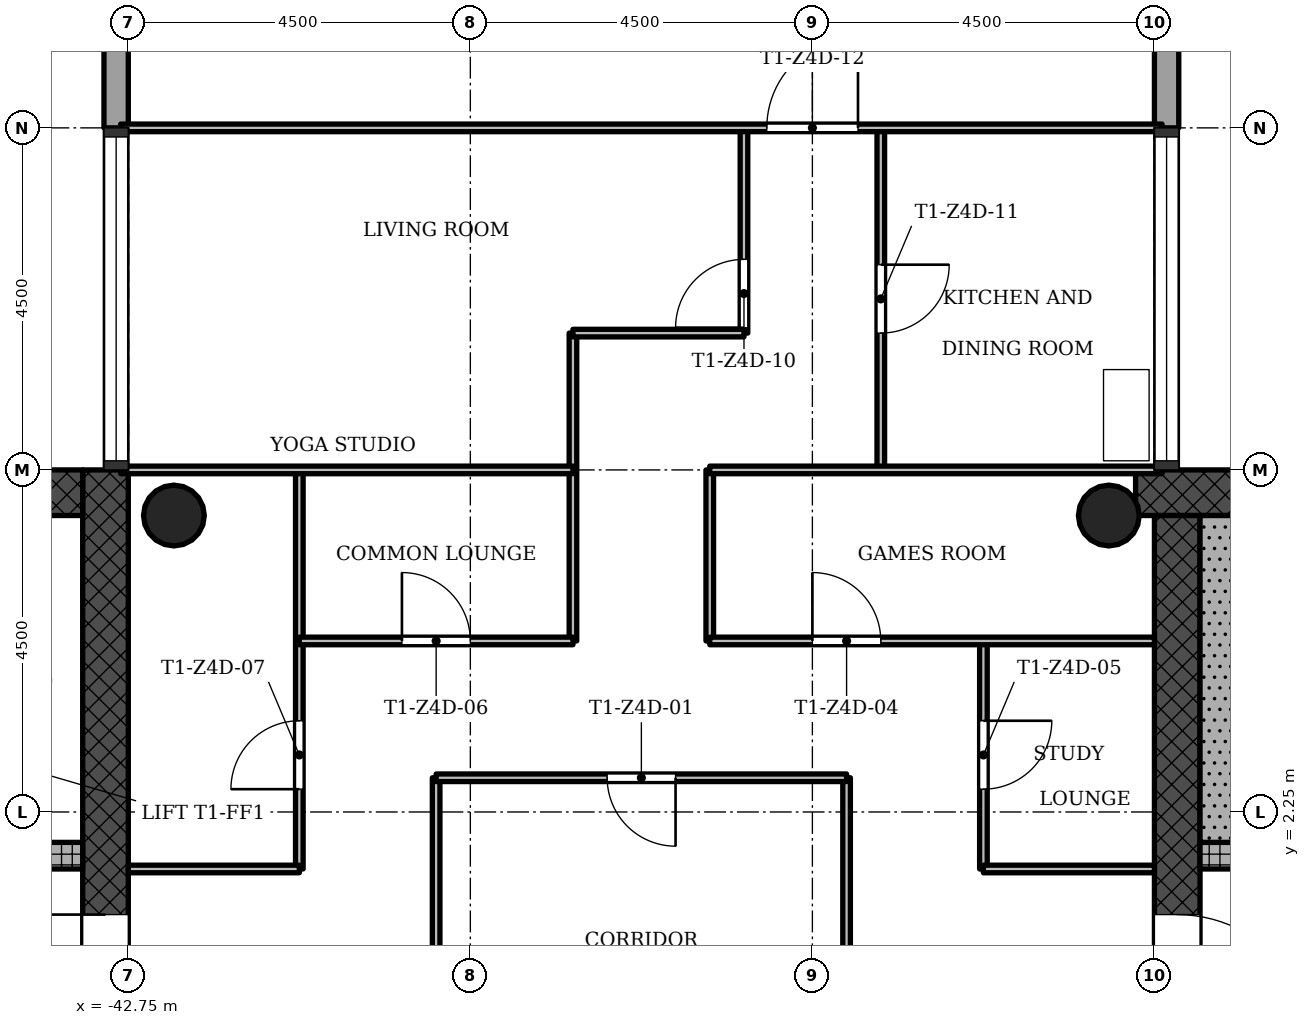
"""IFC4 building model, lengths in metres.
Left out: names, types, materials, properties, quantities, classifications, styles, units other than length and angle.
Written with IfcOpenShell. Run it as: python <this file> out.ifc"""

import sys

from ifc_helpers import new_model, si_unit, direction, frame, frame_2d, origin, origin_2d, place, context, subcontext, project, spatial, rectangle, hollow_circle, extrude, element, fill, save


model = new_model("IFC4")
c1 = context("Model", 3, precision=1e-05, world=origin(), true_north=direction((0.0, 1.0)))
c2 = subcontext(c1, "Body", "Model", "MODEL_VIEW")
j1 = project(units=[si_unit("LENGTHUNIT", "METRE"), si_unit("PLANEANGLEUNIT", "RADIAN")], contexts=[c1])
p1 = place(None, origin())
s1 = spatial("IfcSite", under=j1, at=p1, CompositionType="ELEMENT")
p2 = place(p1, origin())
s2 = spatial("IfcBuilding", under=s1, at=p2, CompositionType="ELEMENT")
p3 = place(p2, frame((0.0, 0.0, 196.0)))
s3 = spatial("IfcBuildingStorey", under=s2, at=p3, CompositionType="ELEMENT", Elevation=196.0)
p4 = place(p3, frame((-20.602, 6.45, 0.0), z_axis=(0.0, 0.0, 1.0), x_axis=(-1.0, 0.0, 0.0)))
e1 = element("IfcWall", 1, at=p4, inside=s3, PredefinedType="SHEAR", context=c2, shape_type="SweptSolid", body=[
    extrude(rectangle(XDim=8.896, YDim=0.6, at=frame_2d((4.448, 0.0))), origin(), (0.0, 0.0, 1.0), 3.4),
])
p5 = place(p3, frame((-28.95, 6.15, 0.0), z_axis=(0.0, 0.0, 1.0), x_axis=(0.0, -1.0, 0.0)))
e2 = element("IfcWall", 2, at=p5, inside=s3, PredefinedType="SHEAR", context=c2, shape_type="SweptSolid", body=[
    extrude(rectangle(XDim=12.9, YDim=0.6, at=frame_2d((6.45, 0.0))), origin(), (0.0, 0.0, 1.0), 3.4),
])
p6 = place(p5, frame((5.25, 0.0, 0.0)))
e3 = element("IfcOpeningElement", 3, at=p6, cuts=e2, PredefinedType="OPENING", context=c2, shape_type="SweptSolid", body=[
    extrude(rectangle(XDim=1.8, YDim=2.1, at=frame_2d((0.9, 1.05))), frame((0.0, 0.31, 0.0), z_axis=(0.0, -1.0, 0.0), x_axis=(1.0, 0.0, 0.0)), (0.0, 0.0, 1.0), 0.62),
])
p7 = place(p3, frame((-28.65, 1.675, 0.0), z_axis=(0.0, 0.0, 1.0), x_axis=(1.0, 0.0, 0.0)))
e4 = element("IfcWall", 4, at=p7, inside=s3, PredefinedType="SHEAR", context=c2, shape_type="SweptSolid", body=[
    extrude(rectangle(XDim=7.8, YDim=0.35, at=frame_2d((3.9, 0.0))), origin(), (0.0, 0.0, 1.0), 3.4),
])
p8 = place(p7, frame((1.05, 0.0, 0.0)))
e5 = element("IfcOpeningElement", 5, at=p8, cuts=e4, PredefinedType="OPENING", context=c2, shape_type="SweptSolid", body=[
    extrude(rectangle(XDim=0.9, YDim=2.1, at=frame_2d((0.45, 1.05))), frame((0.0, 0.185, 0.0), z_axis=(0.0, -1.0, 0.0), x_axis=(1.0, 0.0, 0.0)), (0.0, 0.0, 1.0), 0.37),
])
p9 = place(p3, frame((-43.05, -6.15, 0.0), z_axis=(0.0, 0.0, 1.0), x_axis=(0.0, 1.0, 0.0)))
e6 = element("IfcWall", 6, at=p9, inside=s3, PredefinedType="SHEAR", context=c2, shape_type="SweptSolid", body=[
    extrude(rectangle(XDim=12.9, YDim=0.6, at=frame_2d((6.45, 0.0))), origin(), (0.0, 0.0, 1.0), 3.4),
])
p10 = place(p9, frame((5.25, 0.0, 0.0)))
e7 = element("IfcOpeningElement", 7, at=p10, cuts=e6, PredefinedType="OPENING", context=c2, shape_type="SweptSolid", body=[
    extrude(rectangle(XDim=1.8, YDim=2.1, at=frame_2d((0.9, 1.05))), frame((0.0, 0.31, 0.0), z_axis=(0.0, -1.0, 0.0), x_axis=(1.0, 0.0, 0.0)), (0.0, 0.0, 1.0), 0.62),
])
p11 = place(p3, frame((-43.35, 6.45, 0.0), z_axis=(0.0, 0.0, 1.0), x_axis=(-1.0, 0.0, 0.0)))
e8 = element("IfcWall", 8, at=p11, inside=s3, PredefinedType="SHEAR", context=c2, shape_type="SweptSolid", body=[
    extrude(rectangle(XDim=8.4, YDim=0.6, at=frame_2d((4.2, 0.0))), origin(), (0.0, 0.0, 1.0), 3.4),
])
p12 = place(p3, frame((-51.15, 1.675, 0.0), z_axis=(0.0, 0.0, 1.0), x_axis=(1.0, 0.0, 0.0)))
e9 = element("IfcWall", 9, at=p12, inside=s3, PredefinedType="SHEAR", context=c2, shape_type="SweptSolid", body=[
    extrude(rectangle(XDim=7.8, YDim=0.35, at=frame_2d((3.9, 0.0))), origin(), (0.0, 0.0, 1.0), 3.4),
])
p13 = place(p12, frame((5.55, 0.0, 0.0)))
e10 = element("IfcOpeningElement", 10, at=p13, cuts=e9, PredefinedType="OPENING", context=c2, shape_type="SweptSolid", body=[
    extrude(rectangle(XDim=1.1, YDim=2.1, at=frame_2d((0.55, 1.05))), frame((0.0, 0.185, 0.0), z_axis=(0.0, -1.0, 0.0), x_axis=(1.0, 0.0, 0.0)), (0.0, 0.0, 1.0), 0.37),
])
p14 = place(p12, frame((1.2, 0.0, 0.0)))
e11 = element("IfcOpeningElement", 11, at=p14, cuts=e9, PredefinedType="OPENING", context=c2, shape_type="SweptSolid", body=[
    extrude(rectangle(XDim=1.1, YDim=2.1, at=frame_2d((0.55, 1.05))), frame((0.0, 0.185, 0.0), z_axis=(0.0, -1.0, 0.0), x_axis=(1.0, 0.0, 0.0)), (0.0, 0.0, 1.0), 0.37),
])
p15 = place(p12, frame((3.5, 0.0, 0.0)))
e12 = element("IfcOpeningElement", 12, at=p15, cuts=e9, PredefinedType="OPENING", context=c2, shape_type="SweptSolid", body=[
    extrude(rectangle(XDim=0.9, YDim=2.1, at=frame_2d((0.45, 1.05))), frame((0.0, 0.185, 0.0), z_axis=(0.0, -1.0, 0.0), x_axis=(1.0, 0.0, 0.0)), (0.0, 0.0, 1.0), 0.37),
])
for number, where, z_axis, x_axis in (
    (13, (-29.85, 6.15, 0.0), (0.0, 0.0, 1.0), (1.0, 0.0, 0.0)),
    (14, (-42.15, 6.15, 0.0), (0.0, 0.0, 1.0), (1.0, 0.0, 0.0)),
):
    element("IfcColumn", number, at=place(p3, frame(where, z_axis=z_axis, x_axis=x_axis)), inside=s3, PredefinedType="COLUMN", context=c2, shape_type="SweptSolid", body=[
        extrude(hollow_circle(Radius=0.4, WallThickness=0.028, at=origin_2d()), origin(), (0.0, 0.0, 1.0), 3.4),
    ])
p16 = place(p3, frame((-29.09, 11.25, -0.3), z_axis=(0.0, 0.0, 1.0), x_axis=(0.0, 1.0, 0.0)))
e15 = element("IfcWall", 15, at=p16, inside=s3, PredefinedType="STANDARD", context=c2, shape_type="SweptSolid", body=[
    extrude(rectangle(XDim=1.82, YDim=0.32, at=frame_2d((0.91, 0.0))), origin(), (0.0, 0.0, 1.0), 3.4),
])
p17 = place(p3, frame((-42.91, 12.75, -0.3), z_axis=(0.0, 0.0, 1.0), x_axis=(0.0, -1.0, 0.0)))
e16 = element("IfcWall", 16, at=p17, inside=s3, PredefinedType="STANDARD", context=c2, shape_type="SweptSolid", body=[
    extrude(rectangle(XDim=1.5, YDim=0.32, at=frame_2d((0.75, 0.0))), origin(), (0.0, 0.0, 1.0), 3.4),
])
p18 = place(p3, frame((-40.5, 1.5, 0.0), z_axis=(0.0, 0.0, 1.0), x_axis=(0.0, 1.0, 0.0)))
e17 = element("IfcWall", 17, at=p18, inside=s3, PredefinedType="PARTITIONING", context=c2, shape_type="SweptSolid", body=[
    extrude(rectangle(XDim=5.25, YDim=0.1, at=frame_2d((2.625, 0.0))), origin(), (0.0, 0.0, 1.0), 3.0),
])
p19 = place(p18, frame((1.05, 0.0, 0.0)))
e18 = element("IfcOpeningElement", 18, at=p19, cuts=e17, PredefinedType="OPENING", context=c2, shape_type="SweptSolid", body=[
    extrude(rectangle(XDim=0.9, YDim=2.1, at=frame_2d((0.45, 1.05))), frame((0.0, 0.06, 0.0), z_axis=(0.0, -1.0, 0.0), x_axis=(1.0, 0.0, 0.0)), (0.0, 0.0, 1.0), 0.12),
])
p20 = place(p3, frame((-38.7, -2.7, 0.0), z_axis=(0.0, 0.0, 1.0), x_axis=(0.0, 1.0, 0.0)))
e19 = element("IfcWall", 19, at=p20, inside=s3, PredefinedType="PARTITIONING", context=c2, shape_type="SweptSolid", body=[
    extrude(rectangle(XDim=5.4, YDim=0.1, at=frame_2d((2.7, 0.0))), origin(), (0.0, 0.0, 1.0), 3.0),
])
p21 = place(p3, frame((-36.9, 4.5, 0.0), z_axis=(0.0, 0.0, 1.0), x_axis=(0.0, 1.0, 0.0)))
e20 = element("IfcWall", 20, at=p21, inside=s3, PredefinedType="PARTITIONING", context=c2, shape_type="SweptSolid", body=[
    extrude(rectangle(XDim=4.05, YDim=0.1, at=frame_2d((2.025, 0.0))), origin(), (0.0, 0.0, 1.0), 3.0),
])
p22 = place(p3, frame((-35.1, 4.5, 0.0), z_axis=(0.0, 0.0, 1.0), x_axis=(0.0, 1.0, 0.0)))
e21 = element("IfcWall", 21, at=p22, inside=s3, PredefinedType="PARTITIONING", context=c2, shape_type="SweptSolid", body=[
    extrude(rectangle(XDim=2.25, YDim=0.1, at=frame_2d((1.125, 0.0))), origin(), (0.0, 0.0, 1.0), 3.0),
])
p23 = place(p3, frame((-34.65, 8.55, 0.0), z_axis=(0.0, 0.0, 1.0), x_axis=(0.0, 1.0, 0.0)))
e22 = element("IfcWall", 22, at=p23, inside=s3, PredefinedType="PARTITIONING", context=c2, shape_type="SweptSolid", body=[
    extrude(rectangle(XDim=2.7, YDim=0.1, at=frame_2d((1.35, 0.0))), origin(), (0.0, 0.0, 1.0), 3.0),
])
p24 = place(p23, frame((0.07, 0.0, 0.0)))
e23 = element("IfcOpeningElement", 23, at=p24, cuts=e22, PredefinedType="OPENING", context=c2, shape_type="SweptSolid", body=[
    extrude(rectangle(XDim=0.9, YDim=2.1, at=frame_2d((0.45, 1.05))), frame((0.0, 0.06, 0.0), z_axis=(0.0, -1.0, 0.0), x_axis=(1.0, 0.0, 0.0)), (0.0, 0.0, 1.0), 0.12),
])
p25 = place(p3, frame((-33.3, -2.7, 0.0), z_axis=(0.0, 0.0, 1.0), x_axis=(0.0, 1.0, 0.0)))
e24 = element("IfcWall", 24, at=p25, inside=s3, PredefinedType="PARTITIONING", context=c2, shape_type="SweptSolid", body=[
    extrude(rectangle(XDim=5.4, YDim=0.1, at=frame_2d((2.7, 0.0))), origin(), (0.0, 0.0, 1.0), 3.0),
])
p26 = place(p25, frame((2.25, 0.0, 0.0)))
e25 = element("IfcOpeningElement", 25, at=p26, cuts=e24, PredefinedType="OPENING", context=c2, shape_type="SweptSolid", body=[
    extrude(rectangle(XDim=0.9, YDim=2.1, at=frame_2d((0.45, 1.05))), frame((0.0, 0.06, 0.0), z_axis=(0.0, -1.0, 0.0), x_axis=(1.0, 0.0, 0.0)), (0.0, 0.0, 1.0), 0.12),
])
p27 = place(p3, frame((-32.85, 6.75, 0.0), z_axis=(0.0, 0.0, 1.0), x_axis=(0.0, 1.0, 0.0)))
e26 = element("IfcWall", 26, at=p27, inside=s3, PredefinedType="PARTITIONING", context=c2, shape_type="SweptSolid", body=[
    extrude(rectangle(XDim=4.5, YDim=0.1, at=frame_2d((2.25, 0.0))), origin(), (0.0, 0.0, 1.0), 3.0),
])
p28 = place(p27, frame((1.8, 0.0, 0.0)))
e27 = element("IfcOpeningElement", 27, at=p28, cuts=e26, PredefinedType="OPENING", context=c2, shape_type="SweptSolid", body=[
    extrude(rectangle(XDim=0.9, YDim=2.1, at=frame_2d((0.45, 1.05))), frame((0.0, 0.06, 0.0), z_axis=(0.0, -1.0, 0.0), x_axis=(1.0, 0.0, 0.0)), (0.0, 0.0, 1.0), 0.12),
])
p29 = place(p3, frame((-31.5, 1.5, 0.0), z_axis=(0.0, 0.0, 1.0), x_axis=(0.0, 1.0, 0.0)))
e28 = element("IfcWall", 28, at=p29, inside=s3, PredefinedType="PARTITIONING", context=c2, shape_type="SweptSolid", body=[
    extrude(rectangle(XDim=3.0, YDim=0.1, at=frame_2d((1.5, 0.0))), origin(), (0.0, 0.0, 1.0), 3.0),
])
p30 = place(p29, frame((1.05, 0.0, 0.0)))
e29 = element("IfcOpeningElement", 29, at=p30, cuts=e28, PredefinedType="OPENING", context=c2, shape_type="SweptSolid", body=[
    extrude(rectangle(XDim=0.9, YDim=2.1, at=frame_2d((0.45, 1.05))), frame((0.0, 0.06, 0.0), z_axis=(0.0, -1.0, 0.0), x_axis=(1.0, 0.0, 0.0)), (0.0, 0.0, 1.0), 0.12),
])
for number, where, z_axis, x_axis in (
    (30, (-42.75, 1.5, 0.0), (0.0, 0.0, 1.0), (1.0, 0.0, 0.0)),
    (31, (-31.5, 1.5, 0.0), (0.0, 0.0, 1.0), (1.0, 0.0, 0.0)),
):
    element("IfcWall", number, at=place(p3, frame(where, z_axis=z_axis, x_axis=x_axis)), inside=s3, PredefinedType="PARTITIONING", context=c2, shape_type="SweptSolid", body=[
        extrude(rectangle(XDim=2.25, YDim=0.1, at=frame_2d((1.125, 0.0))), origin(), (0.0, 0.0, 1.0), 3.0),
    ])
p31 = place(p3, frame((-38.7, 2.7, 0.0), z_axis=(0.0, 0.0, 1.0), x_axis=(1.0, 0.0, 0.0)))
e32 = element("IfcWall", 32, at=p31, inside=s3, PredefinedType="PARTITIONING", context=c2, shape_type="SweptSolid", body=[
    extrude(rectangle(XDim=5.4, YDim=0.1, at=frame_2d((2.7, 0.0))), origin(), (0.0, 0.0, 1.0), 3.0),
])
p32 = place(p31, frame((2.25, 0.0, 0.0)))
e33 = element("IfcOpeningElement", 33, at=p32, cuts=e32, PredefinedType="OPENING", context=c2, shape_type="SweptSolid", body=[
    extrude(rectangle(XDim=0.9, YDim=2.1, at=frame_2d((0.45, 1.05))), frame((0.0, 0.06, 0.0), z_axis=(0.0, -1.0, 0.0), x_axis=(1.0, 0.0, 0.0)), (0.0, 0.0, 1.0), 0.12),
])
p33 = place(p3, frame((-40.5, 4.5, 0.0), z_axis=(0.0, 0.0, 1.0), x_axis=(1.0, 0.0, 0.0)))
e34 = element("IfcWall", 34, at=p33, inside=s3, PredefinedType="PARTITIONING", context=c2, shape_type="SweptSolid", body=[
    extrude(rectangle(XDim=3.6, YDim=0.1, at=frame_2d((1.8, 0.0))), origin(), (0.0, 0.0, 1.0), 3.0),
])
p34 = place(p33, frame((1.35, 0.0, 0.0)))
e35 = element("IfcOpeningElement", 35, at=p34, cuts=e34, PredefinedType="OPENING", context=c2, shape_type="SweptSolid", body=[
    extrude(rectangle(XDim=0.9, YDim=2.1, at=frame_2d((0.45, 1.05))), frame((0.0, 0.06, 0.0), z_axis=(0.0, -1.0, 0.0), x_axis=(1.0, 0.0, 0.0)), (0.0, 0.0, 1.0), 0.12),
])
p35 = place(p3, frame((-35.1, 4.5, 0.0), z_axis=(0.0, 0.0, 1.0), x_axis=(1.0, 0.0, 0.0)))
e36 = element("IfcWall", 36, at=p35, inside=s3, PredefinedType="PARTITIONING", context=c2, shape_type="SweptSolid", body=[
    extrude(rectangle(XDim=5.85, YDim=0.1, at=frame_2d((2.925, 0.0))), origin(), (0.0, 0.0, 1.0), 3.0),
])
p36 = place(p35, frame((1.35, 0.0, 0.0)))
e37 = element("IfcOpeningElement", 37, at=p36, cuts=e36, PredefinedType="OPENING", context=c2, shape_type="SweptSolid", body=[
    extrude(rectangle(XDim=0.9, YDim=2.1, at=frame_2d((0.45, 1.05))), frame((0.0, 0.06, 0.0), z_axis=(0.0, -1.0, 0.0), x_axis=(1.0, 0.0, 0.0)), (0.0, 0.0, 1.0), 0.12),
])
for number, where, z_axis, x_axis in (
    (38, (-42.85, 6.75, 0.0), (0.0, 0.0, 1.0), (1.0, 0.0, 0.0)),
    (39, (-35.1, 6.75, 0.0), (0.0, 0.0, 1.0), (1.0, 0.0, 0.0)),
):
    element("IfcWall", number, at=place(p3, frame(where, z_axis=z_axis, x_axis=x_axis)), inside=s3, PredefinedType="PARTITIONING", context=c2, shape_type="SweptSolid", body=[
        extrude(rectangle(XDim=5.95, YDim=0.1, at=frame_2d((2.975, 0.0))), origin(), (0.0, 0.0, 1.0), 3.0),
    ])
p37 = place(p3, frame((-36.9, 8.55, 0.0), z_axis=(0.0, 0.0, 1.0), x_axis=(1.0, 0.0, 0.0)))
e40 = element("IfcWall", 40, at=p37, inside=s3, PredefinedType="PARTITIONING", context=c2, shape_type="SweptSolid", body=[
    extrude(rectangle(XDim=2.25, YDim=0.1, at=frame_2d((1.125, 0.0))), origin(), (0.0, 0.0, 1.0), 3.0),
])
p38 = place(p3, frame((-42.85, 11.25, 0.0), z_axis=(0.0, 0.0, 1.0), x_axis=(1.0, 0.0, 0.0)))
e41 = element("IfcWall", 41, at=p38, inside=s3, PredefinedType="PARTITIONING", context=c2, shape_type="SweptSolid", body=[
    extrude(rectangle(XDim=13.7, YDim=0.1, at=frame_2d((6.85, 0.0))), origin(), (0.0, 0.0, 1.0), 3.0),
])
p39 = place(p38, frame((8.5, 0.0, 0.0)))
e42 = element("IfcOpeningElement", 42, at=p39, cuts=e41, PredefinedType="OPENING", context=c2, shape_type="SweptSolid", body=[
    extrude(rectangle(XDim=1.2, YDim=2.1, at=frame_2d((0.6, 1.05))), frame((0.0, 0.06, 0.0), z_axis=(0.0, -1.0, 0.0), x_axis=(1.0, 0.0, 0.0)), (0.0, 0.0, 1.0), 0.12),
])
p40 = place(p3, frame((-28.35, 1.85, 0.0), z_axis=(0.0, 0.0, 1.0), x_axis=(0.0, 1.0, 0.0)))
e43 = element("IfcWall", 43, at=p40, inside=s3, PredefinedType="SHEAR", context=c2, shape_type="SweptSolid", body=[
    extrude(rectangle(XDim=4.3, YDim=0.6, at=frame_2d((2.15, 0.0))), origin(), (0.0, 0.0, 1.0), 3.4),
])
p41 = place(p32, origin())
e44 = element("IfcDoor", 44, at=p41, inside=s3, OperationType="SINGLE_SWING_RIGHT", PredefinedType="DOOR", context=c2, shape_type="SweptSolid", body=[
    extrude(rectangle(XDim=0.9, YDim=2.1, at=frame_2d((0.45, 1.05))), frame((0.0, 0.025, 0.0), z_axis=(0.0, -1.0, 0.0), x_axis=(1.0, 0.0, 0.0)), (0.0, 0.0, 1.0), 0.05),
])
fill(e33, e44)
p42 = place(p36, origin())
e45 = element("IfcDoor", 45, at=p42, inside=s3, OperationType="SINGLE_SWING_RIGHT", PredefinedType="DOOR", context=c2, shape_type="SweptSolid", body=[
    extrude(rectangle(XDim=0.9, YDim=2.1, at=frame_2d((0.45, 1.05))), frame((0.0, 0.025, 0.0), z_axis=(0.0, -1.0, 0.0), x_axis=(1.0, 0.0, 0.0)), (0.0, 0.0, 1.0), 0.05),
])
fill(e37, e45)
p43 = place(p30, origin())
e46 = element("IfcDoor", 46, at=p43, inside=s3, OperationType="SINGLE_SWING_RIGHT", PredefinedType="DOOR", context=c2, shape_type="SweptSolid", body=[
    extrude(rectangle(XDim=0.9, YDim=2.1, at=frame_2d((0.45, 1.05))), frame((0.0, 0.025, 0.0), z_axis=(0.0, -1.0, 0.0), x_axis=(1.0, 0.0, 0.0)), (0.0, 0.0, 1.0), 0.05),
])
fill(e29, e46)
p44 = place(p34, origin())
e47 = element("IfcDoor", 47, at=p44, inside=s3, OperationType="SINGLE_SWING_RIGHT", PredefinedType="DOOR", context=c2, shape_type="SweptSolid", body=[
    extrude(rectangle(XDim=0.9, YDim=2.1, at=frame_2d((0.45, 1.05))), frame((0.0, 0.025, 0.0), z_axis=(0.0, -1.0, 0.0), x_axis=(1.0, 0.0, 0.0)), (0.0, 0.0, 1.0), 0.05),
])
fill(e35, e47)
p45 = place(p19, origin())
e48 = element("IfcDoor", 48, at=p45, inside=s3, OperationType="SINGLE_SWING_RIGHT", PredefinedType="DOOR", context=c2, shape_type="SweptSolid", body=[
    extrude(rectangle(XDim=0.9, YDim=2.1, at=frame_2d((0.45, 1.05))), frame((0.0, 0.025, 0.0), z_axis=(0.0, -1.0, 0.0), x_axis=(1.0, 0.0, 0.0)), (0.0, 0.0, 1.0), 0.05),
])
fill(e18, e48)
p46 = place(p24, origin())
e49 = element("IfcDoor", 49, at=p46, inside=s3, OperationType="SINGLE_SWING_RIGHT", PredefinedType="DOOR", context=c2, shape_type="SweptSolid", body=[
    extrude(rectangle(XDim=0.9, YDim=2.1, at=frame_2d((0.45, 1.05))), frame((0.0, 0.025, 0.0), z_axis=(0.0, -1.0, 0.0), x_axis=(1.0, 0.0, 0.0)), (0.0, 0.0, 1.0), 0.05),
])
fill(e23, e49)
p47 = place(p28, origin())
e50 = element("IfcDoor", 50, at=p47, inside=s3, OperationType="SINGLE_SWING_RIGHT", PredefinedType="DOOR", context=c2, shape_type="SweptSolid", body=[
    extrude(rectangle(XDim=0.9, YDim=2.1, at=frame_2d((0.45, 1.05))), frame((0.0, 0.025, 0.0), z_axis=(0.0, -1.0, 0.0), x_axis=(1.0, 0.0, 0.0)), (0.0, 0.0, 1.0), 0.05),
])
fill(e27, e50)
p48 = place(p39, origin())
e51 = element("IfcDoor", 51, at=p48, inside=s3, OperationType="SINGLE_SWING_LEFT", PredefinedType="DOOR", context=c2, shape_type="SweptSolid", body=[
    extrude(rectangle(XDim=1.2, YDim=2.1, at=frame_2d((0.6, 1.05))), frame((0.0, 0.025, 0.0), z_axis=(0.0, -1.0, 0.0), x_axis=(1.0, 0.0, 0.0)), (0.0, 0.0, 1.0), 0.05),
])
fill(e42, e51)
p49 = place(p6, origin())
e52 = element("IfcDoor", 52, at=p49, inside=s3, OperationType="SINGLE_SWING_LEFT", PredefinedType="DOOR", context=c2, shape_type="SweptSolid", body=[
    extrude(rectangle(XDim=1.8, YDim=2.1, at=frame_2d((0.9, 1.05))), frame((0.0, 0.025, 0.0), z_axis=(0.0, -1.0, 0.0), x_axis=(1.0, 0.0, 0.0)), (0.0, 0.0, 1.0), 0.05),
])
fill(e3, e52)
p50 = place(p10, origin())
e53 = element("IfcDoor", 53, at=p50, inside=s3, OperationType="SINGLE_SWING_LEFT", PredefinedType="DOOR", context=c2, shape_type="SweptSolid", body=[
    extrude(rectangle(XDim=1.8, YDim=2.1, at=frame_2d((0.9, 1.05))), frame((0.0, 0.025, 0.0), z_axis=(0.0, -1.0, 0.0), x_axis=(1.0, 0.0, 0.0)), (0.0, 0.0, 1.0), 0.05),
])
fill(e7, e53)
save(model, sys.argv[1])
